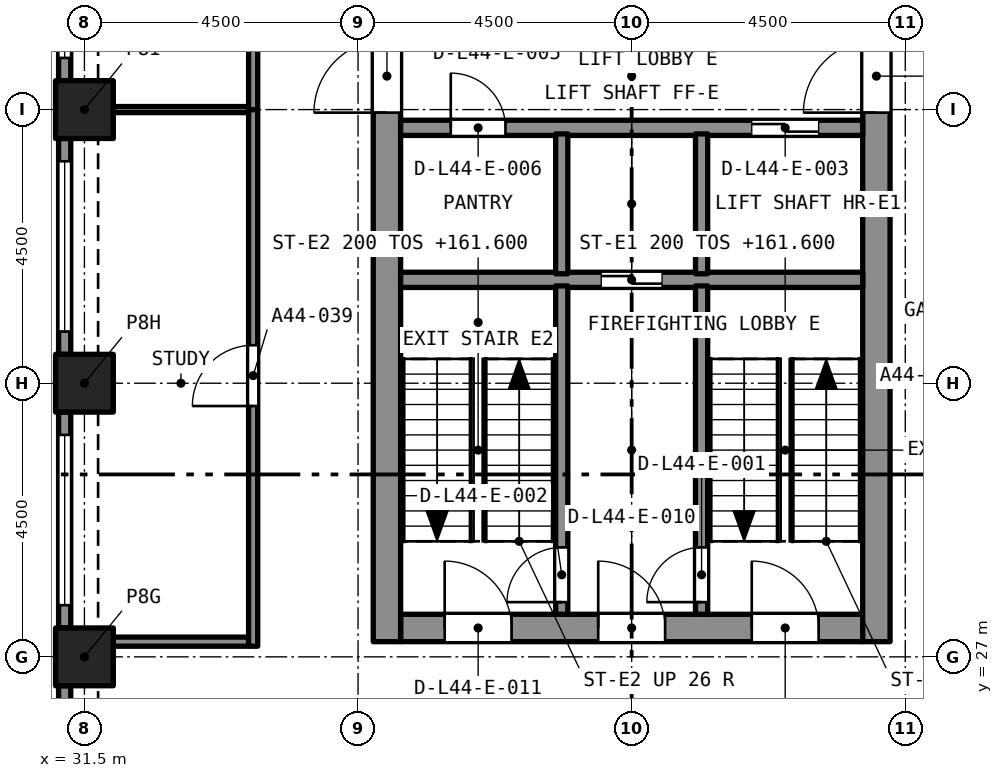
"""IFC4 building model, lengths in metres.
Left out: names, types, materials, properties, quantities, classifications, styles, units other than length and angle.
Written with IfcOpenShell. Run it as: python <this file> out.ifc"""

import sys

from ifc_helpers import new_model, si_unit, direction, frame, frame_2d, origin, origin_2d, place, context, subcontext, project, spatial, rectangle, extrude, element, fill, save


model = new_model("IFC4")
c1 = context("Model", 3, precision=1e-05, world=origin(), true_north=direction((0.0, 1.0)))
c2 = subcontext(c1, "Body", "Model", "MODEL_VIEW")
j1 = project(units=[si_unit("LENGTHUNIT", "METRE"), si_unit("PLANEANGLEUNIT", "RADIAN")], contexts=[c1])
p1 = place(None, origin())
s1 = spatial("IfcSite", under=j1, at=p1, CompositionType="ELEMENT")
p2 = place(p1, origin())
s2 = spatial("IfcBuilding", under=s1, at=p2, CompositionType="ELEMENT")
p3 = place(p2, frame((0.0, 0.0, 159.4)))
s3 = spatial("IfcBuildingStorey", under=s2, at=p3, CompositionType="ELEMENT", Elevation=159.4)
for number, where, z_axis, x_axis in (
    (1, (31.5, 27.0, 0.0), (0.0, 0.0, 1.0), (1.0, 0.0, 0.0)),
    (2, (31.5, 31.5, 0.0), (0.0, 0.0, 1.0), (1.0, 0.0, 0.0)),
    (3, (31.5, 36.0, 0.0), (0.0, 0.0, 1.0), (1.0, 0.0, 0.0)),
):
    element("IfcColumn", number, at=place(p3, frame(where, z_axis=z_axis, x_axis=x_axis)), inside=s3, PredefinedType="COLUMN", context=c2, shape_type="SweptSolid", body=[
        extrude(rectangle(XDim=0.95, YDim=0.95, at=origin_2d()), origin(), (0.0, 0.0, 1.0), 4.4),
    ])
p4 = place(p3, frame((36.7, 27.475, 0.0), z_axis=(0.0, 0.0, 1.0), x_axis=(1.0, 0.0, 0.0)))
e4 = element("IfcWall", 4, at=p4, inside=s3, PredefinedType="SOLIDWALL", context=c2, shape_type="SweptSolid", body=[
    extrude(rectangle(XDim=7.6, YDim=0.45, at=frame_2d((3.8, 0.0))), origin(), (0.0, 0.0, 1.0), 4.4),
])
p5 = place(p4, frame((5.775, 0.0, 0.0)))
e5 = element("IfcOpeningElement", 5, at=p5, cuts=e4, PredefinedType="OPENING", context=c2, shape_type="SweptSolid", body=[
    extrude(rectangle(XDim=1.1, YDim=2.1, at=frame_2d((0.55, 1.05))), frame((0.0, 0.235, 0.0), z_axis=(0.0, -1.0, 0.0), x_axis=(1.0, 0.0, 0.0)), (0.0, 0.0, 1.0), 0.47),
])
p6 = place(p4, frame((3.25, 0.0, 0.0)))
e6 = element("IfcOpeningElement", 6, at=p6, cuts=e4, PredefinedType="OPENING", context=c2, shape_type="SweptSolid", body=[
    extrude(rectangle(XDim=1.1, YDim=2.1, at=frame_2d((0.55, 1.05))), frame((0.0, 0.235, 0.0), z_axis=(0.0, -1.0, 0.0), x_axis=(1.0, 0.0, 0.0)), (0.0, 0.0, 1.0), 0.47),
])
p7 = place(p4, frame((0.725, 0.0, 0.0)))
e7 = element("IfcOpeningElement", 7, at=p7, cuts=e4, PredefinedType="OPENING", context=c2, shape_type="SweptSolid", body=[
    extrude(rectangle(XDim=1.1, YDim=2.1, at=frame_2d((0.55, 1.05))), frame((0.0, 0.235, 0.0), z_axis=(0.0, -1.0, 0.0), x_axis=(1.0, 0.0, 0.0)), (0.0, 0.0, 1.0), 0.47),
])
p8 = place(p3, frame((36.475, 27.25, 0.0), z_axis=(0.0, 0.0, 1.0), x_axis=(0.0, 1.0, 0.0)))
e8 = element("IfcWall", 8, at=p8, inside=s3, PredefinedType="SOLIDWALL", context=c2, shape_type="SweptSolid", body=[
    extrude(rectangle(XDim=13.0, YDim=0.45, at=frame_2d((6.5, 0.0))), origin(), (0.0, 0.0, 1.0), 4.4),
])
p9 = place(p8, frame((8.7, 0.0, 0.0)))
e9 = element("IfcOpeningElement", 9, at=p9, cuts=e8, PredefinedType="OPENING", context=c2, shape_type="SweptSolid", body=[
    extrude(rectangle(XDim=1.2, YDim=2.1, at=frame_2d((0.6, 1.05))), frame((0.0, 0.235, 0.0), z_axis=(0.0, -1.0, 0.0), x_axis=(1.0, 0.0, 0.0)), (0.0, 0.0, 1.0), 0.47),
])
p10 = place(p3, frame((44.525, 27.25, 0.0), z_axis=(0.0, 0.0, 1.0), x_axis=(0.0, 1.0, 0.0)))
e10 = element("IfcWall", 10, at=p10, inside=s3, PredefinedType="SOLIDWALL", context=c2, shape_type="SweptSolid", body=[
    extrude(rectangle(XDim=13.0, YDim=0.45, at=frame_2d((6.5, 0.0))), origin(), (0.0, 0.0, 1.0), 4.4),
])
p11 = place(p10, frame((8.7, 0.0, 0.0)))
e11 = element("IfcOpeningElement", 11, at=p11, cuts=e10, PredefinedType="OPENING", context=c2, shape_type="SweptSolid", body=[
    extrude(rectangle(XDim=1.2, YDim=2.1, at=frame_2d((0.6, 1.05))), frame((0.0, 0.235, 0.0), z_axis=(0.0, -1.0, 0.0), x_axis=(1.0, 0.0, 0.0)), (0.0, 0.0, 1.0), 0.47),
])
p12 = place(p3, frame((31.175, 36.475, 0.0), z_axis=(0.0, 0.0, 1.0), x_axis=(0.0, 1.0, 0.0)))
e12 = element("IfcWall", 12, at=p12, inside=s3, PredefinedType="SOLIDWALL", context=c2, shape_type="SweptSolid", body=[
    extrude(rectangle(XDim=3.55, YDim=0.2, at=frame_2d((1.775, 0.0))), origin(), (0.0, 0.0, 1.0), 4.4),
])
p13 = place(p12, frame((0.375, 0.0, 0.45)))
e13 = element("IfcOpeningElement", 13, at=p13, cuts=e12, PredefinedType="OPENING", context=c2, shape_type="SweptSolid", body=[
    extrude(rectangle(XDim=2.8, YDim=2.55, at=frame_2d((1.4, 1.275))), frame((0.0, 0.11, 0.0), z_axis=(0.0, -1.0, 0.0), x_axis=(1.0, 0.0, 0.0)), (0.0, 0.0, 1.0), 0.22),
])
p14 = place(p3, frame((31.175, 31.975, 0.0), z_axis=(0.0, 0.0, 1.0), x_axis=(0.0, 1.0, 0.0)))
e14 = element("IfcWall", 14, at=p14, inside=s3, PredefinedType="SOLIDWALL", context=c2, shape_type="SweptSolid", body=[
    extrude(rectangle(XDim=3.55, YDim=0.2, at=frame_2d((1.775, 0.0))), origin(), (0.0, 0.0, 1.0), 4.4),
])
p15 = place(p14, frame((0.375, 0.0, 0.45)))
e15 = element("IfcOpeningElement", 15, at=p15, cuts=e14, PredefinedType="OPENING", context=c2, shape_type="SweptSolid", body=[
    extrude(rectangle(XDim=2.8, YDim=2.55, at=frame_2d((1.4, 1.275))), frame((0.0, 0.11, 0.0), z_axis=(0.0, -1.0, 0.0), x_axis=(1.0, 0.0, 0.0)), (0.0, 0.0, 1.0), 0.22),
])
p16 = place(p3, frame((31.175, 27.475, 0.0), z_axis=(0.0, 0.0, 1.0), x_axis=(0.0, 1.0, 0.0)))
e16 = element("IfcWall", 16, at=p16, inside=s3, PredefinedType="SOLIDWALL", context=c2, shape_type="SweptSolid", body=[
    extrude(rectangle(XDim=3.55, YDim=0.2, at=frame_2d((1.775, 0.0))), origin(), (0.0, 0.0, 1.0), 4.4),
])
p17 = place(p16, frame((0.375, 0.0, 0.45)))
e17 = element("IfcOpeningElement", 17, at=p17, cuts=e16, PredefinedType="OPENING", context=c2, shape_type="SweptSolid", body=[
    extrude(rectangle(XDim=2.8, YDim=2.55, at=frame_2d((1.4, 1.275))), frame((0.0, 0.11, 0.0), z_axis=(0.0, -1.0, 0.0), x_axis=(1.0, 0.0, 0.0)), (0.0, 0.0, 1.0), 0.22),
])
p18 = place(p3, frame((31.175, 22.975, 0.0), z_axis=(0.0, 0.0, 1.0), x_axis=(0.0, 1.0, 0.0)))
e18 = element("IfcWall", 18, at=p18, inside=s3, PredefinedType="SOLIDWALL", context=c2, shape_type="SweptSolid", body=[
    extrude(rectangle(XDim=3.55, YDim=0.2, at=frame_2d((1.775, 0.0))), origin(), (0.0, 0.0, 1.0), 4.4),
])
p19 = place(p18, frame((0.375, 0.0, 0.45)))
e19 = element("IfcOpeningElement", 19, at=p19, cuts=e18, PredefinedType="OPENING", context=c2, shape_type="SweptSolid", body=[
    extrude(rectangle(XDim=2.8, YDim=2.55, at=frame_2d((1.4, 1.275))), frame((0.0, 0.11, 0.0), z_axis=(0.0, -1.0, 0.0), x_axis=(1.0, 0.0, 0.0)), (0.0, 0.0, 1.0), 0.22),
])
p20 = place(p3, frame((31.975, 27.25, 0.0), z_axis=(0.0, 0.0, 1.0), x_axis=(1.0, 0.0, 0.0)))
e20 = element("IfcWall", 20, at=p20, inside=s3, PredefinedType="PARTITIONING", context=c2, shape_type="SweptSolid", body=[
    extrude(rectangle(XDim=2.225, YDim=0.15, at=frame_2d((1.112, 0.0))), origin(), (0.0, 0.0, 1.0), 4.1),
])
p21 = place(p3, frame((34.275, 27.175, 0.0), z_axis=(0.0, 0.0, 1.0), x_axis=(0.0, 1.0, 0.0)))
e21 = element("IfcWall", 21, at=p21, inside=s3, PredefinedType="PARTITIONING", context=c2, shape_type="SweptSolid", body=[
    extrude(rectangle(XDim=8.825, YDim=0.15, at=frame_2d((4.413, 0.0))), origin(), (0.0, 0.0, 1.0), 4.1),
])
p22 = place(p21, frame((3.95, 0.0, 0.0)))
e22 = element("IfcOpeningElement", 22, at=p22, cuts=e21, PredefinedType="OPENING", context=c2, shape_type="SweptSolid", body=[
    extrude(rectangle(XDim=1.0, YDim=2.1, at=frame_2d((0.5, 1.05))), frame((0.0, 0.085, 0.0), z_axis=(0.0, -1.0, 0.0), x_axis=(1.0, 0.0, 0.0)), (0.0, 0.0, 1.0), 0.17),
])
p23 = place(p3, frame((34.275, 36.0, 0.0), z_axis=(0.0, 0.0, 1.0), x_axis=(0.0, 1.0, 0.0)))
e23 = element("IfcWall", 23, at=p23, inside=s3, PredefinedType="PARTITIONING", context=c2, shape_type="SweptSolid", body=[
    extrude(rectangle(XDim=4.125, YDim=0.15, at=frame_2d((2.062, 0.0))), origin(), (0.0, 0.0, 1.0), 4.1),
])
p24 = place(p23, frame((1.625, 0.0, 0.0)))
e24 = element("IfcOpeningElement", 24, at=p24, cuts=e23, PredefinedType="OPENING", context=c2, shape_type="SweptSolid", body=[
    extrude(rectangle(XDim=1.0, YDim=2.1, at=frame_2d((0.5, 1.05))), frame((0.0, 0.085, 0.0), z_axis=(0.0, -1.0, 0.0), x_axis=(1.0, 0.0, 0.0)), (0.0, 0.0, 1.0), 0.17),
])
p25 = place(p3, frame((31.975, 36.0, 0.0), z_axis=(0.0, 0.0, 1.0), x_axis=(1.0, 0.0, 0.0)))
e25 = element("IfcWall", 25, at=p25, inside=s3, PredefinedType="PARTITIONING", context=c2, shape_type="SweptSolid", body=[
    extrude(rectangle(XDim=2.225, YDim=0.1, at=frame_2d((1.112, 0.0))), origin(), (0.0, 0.0, 1.0), 4.1),
])
p26 = place(p3, frame((36.7, 33.2, 0.0), z_axis=(0.0, 0.0, 1.0), x_axis=(1.0, 0.0, 0.0)))
e26 = element("IfcWall", 26, at=p26, inside=s3, PredefinedType="SOLIDWALL", context=c2, shape_type="SweptSolid", body=[
    extrude(rectangle(XDim=7.6, YDim=0.25, at=frame_2d((3.8, 0.0))), origin(), (0.0, 0.0, 1.0), 4.1),
])
p27 = place(p26, frame((3.3, 0.0, 0.0)))
e27 = element("IfcOpeningElement", 27, at=p27, cuts=e26, PredefinedType="OPENING", context=c2, shape_type="SweptSolid", body=[
    extrude(rectangle(XDim=1.0, YDim=2.1, at=frame_2d((0.5, 1.05))), frame((0.0, 0.135, 0.0), z_axis=(0.0, -1.0, 0.0), x_axis=(1.0, 0.0, 0.0)), (0.0, 0.0, 1.0), 0.27),
])
p28 = place(p3, frame((36.7, 35.7, 0.0), z_axis=(0.0, 0.0, 1.0), x_axis=(1.0, 0.0, 0.0)))
e28 = element("IfcWall", 28, at=p28, inside=s3, PredefinedType="SOLIDWALL", context=c2, shape_type="SweptSolid", body=[
    extrude(rectangle(XDim=7.6, YDim=0.25, at=frame_2d((3.8, 0.0))), origin(), (0.0, 0.0, 1.0), 4.1),
])
p29 = place(p28, frame((5.775, 0.0, 0.0)))
e29 = element("IfcOpeningElement", 29, at=p29, cuts=e28, PredefinedType="OPENING", context=c2, shape_type="SweptSolid", body=[
    extrude(rectangle(XDim=1.1, YDim=2.4, at=frame_2d((0.55, 1.2))), frame((0.0, 0.135, 0.0), z_axis=(0.0, -1.0, 0.0), x_axis=(1.0, 0.0, 0.0)), (0.0, 0.0, 1.0), 0.27),
])
p30 = place(p28, frame((0.825, 0.0, 0.0)))
e30 = element("IfcOpeningElement", 30, at=p30, cuts=e28, PredefinedType="OPENING", context=c2, shape_type="SweptSolid", body=[
    extrude(rectangle(XDim=0.9, YDim=2.1, at=frame_2d((0.45, 1.05))), frame((0.0, 0.135, 0.0), z_axis=(0.0, -1.0, 0.0), x_axis=(1.0, 0.0, 0.0)), (0.0, 0.0, 1.0), 0.27),
])
p31 = place(p3, frame((41.65, 27.7, 0.0), z_axis=(0.0, 0.0, 1.0), x_axis=(0.0, 1.0, 0.0)))
e31 = element("IfcWall", 31, at=p31, inside=s3, PredefinedType="SOLIDWALL", context=c2, shape_type="SweptSolid", body=[
    extrude(rectangle(XDim=5.4, YDim=0.2, at=frame_2d((2.7, 0.0))), origin(), (0.0, 0.0, 1.0), 4.1),
])
p32 = place(p31, frame((0.2, 0.0, 0.0)))
e32 = element("IfcOpeningElement", 32, at=p32, cuts=e31, PredefinedType="OPENING", context=c2, shape_type="SweptSolid", body=[
    extrude(rectangle(XDim=0.9, YDim=2.1, at=frame_2d((0.45, 1.05))), frame((0.0, 0.11, 0.0), z_axis=(0.0, -1.0, 0.0), x_axis=(1.0, 0.0, 0.0)), (0.0, 0.0, 1.0), 0.22),
])
p33 = place(p3, frame((39.35, 27.7, 0.0), z_axis=(0.0, 0.0, 1.0), x_axis=(0.0, 1.0, 0.0)))
e33 = element("IfcWall", 33, at=p33, inside=s3, PredefinedType="SOLIDWALL", context=c2, shape_type="SweptSolid", body=[
    extrude(rectangle(XDim=5.4, YDim=0.2, at=frame_2d((2.7, 0.0))), origin(), (0.0, 0.0, 1.0), 4.1),
])
p34 = place(p33, frame((0.2, 0.0, 0.0)))
e34 = element("IfcOpeningElement", 34, at=p34, cuts=e33, PredefinedType="OPENING", context=c2, shape_type="SweptSolid", body=[
    extrude(rectangle(XDim=0.9, YDim=2.1, at=frame_2d((0.45, 1.05))), frame((0.0, 0.11, 0.0), z_axis=(0.0, -1.0, 0.0), x_axis=(1.0, 0.0, 0.0)), (0.0, 0.0, 1.0), 0.22),
])
for number, where, z_axis, x_axis in (
    (35, (41.65, 33.3, 0.0), (0.0, 0.0, 1.0), (0.0, 1.0, 0.0)),
    (36, (39.35, 33.3, 0.0), (0.0, 0.0, 1.0), (0.0, 1.0, 0.0)),
):
    element("IfcWall", number, at=place(p3, frame(where, z_axis=z_axis, x_axis=x_axis)), inside=s3, PredefinedType="SOLIDWALL", context=c2, shape_type="SweptSolid", body=[
        extrude(rectangle(XDim=2.3, YDim=0.2, at=frame_2d((1.15, 0.0))), origin(), (0.0, 0.0, 1.0), 4.1),
    ])
p35 = place(p13, origin())
e37 = element("IfcWindow", 37, at=p35, inside=s3, PartitioningType="SINGLE_PANEL", PredefinedType="WINDOW", context=c2, shape_type="SweptSolid", body=[
    extrude(rectangle(XDim=2.8, YDim=2.55, at=frame_2d((1.4, 1.275))), frame((0.0, 0.03, 0.0), z_axis=(0.0, -1.0, 0.0), x_axis=(1.0, 0.0, 0.0)), (0.0, 0.0, 1.0), 0.06),
])
fill(e13, e37)
p36 = place(p15, origin())
e38 = element("IfcWindow", 38, at=p36, inside=s3, PartitioningType="SINGLE_PANEL", PredefinedType="WINDOW", context=c2, shape_type="SweptSolid", body=[
    extrude(rectangle(XDim=2.8, YDim=2.55, at=frame_2d((1.4, 1.275))), frame((0.0, 0.03, 0.0), z_axis=(0.0, -1.0, 0.0), x_axis=(1.0, 0.0, 0.0)), (0.0, 0.0, 1.0), 0.06),
])
fill(e15, e38)
p37 = place(p17, origin())
e39 = element("IfcWindow", 39, at=p37, inside=s3, PartitioningType="SINGLE_PANEL", PredefinedType="WINDOW", context=c2, shape_type="SweptSolid", body=[
    extrude(rectangle(XDim=2.8, YDim=2.55, at=frame_2d((1.4, 1.275))), frame((0.0, 0.03, 0.0), z_axis=(0.0, -1.0, 0.0), x_axis=(1.0, 0.0, 0.0)), (0.0, 0.0, 1.0), 0.06),
])
fill(e17, e39)
p38 = place(p22, origin())
e40 = element("IfcDoor", 40, at=p38, inside=s3, OperationType="SINGLE_SWING_RIGHT", PredefinedType="DOOR", context=c2, shape_type="SweptSolid", body=[
    extrude(rectangle(XDim=1.0, YDim=2.1, at=frame_2d((0.5, 1.05))), frame((0.0, 0.025, 0.0), z_axis=(0.0, -1.0, 0.0), x_axis=(1.0, 0.0, 0.0)), (0.0, 0.0, 1.0), 0.05),
])
fill(e22, e40)
p39 = place(p32, origin())
e41 = element("IfcDoor", 41, at=p39, inside=s3, OperationType="SINGLE_SWING_LEFT", PredefinedType="DOOR", context=c2, shape_type="SweptSolid", body=[
    extrude(rectangle(XDim=0.9, YDim=2.1, at=frame_2d((0.45, 1.05))), frame((0.0, 0.025, 0.0), z_axis=(0.0, -1.0, 0.0), x_axis=(1.0, 0.0, 0.0)), (0.0, 0.0, 1.0), 0.05),
])
fill(e32, e41)
p40 = place(p34, origin())
e42 = element("IfcDoor", 42, at=p40, inside=s3, OperationType="SINGLE_SWING_LEFT", PredefinedType="DOOR", context=c2, shape_type="SweptSolid", body=[
    extrude(rectangle(XDim=0.9, YDim=2.1, at=frame_2d((0.45, 1.05))), frame((0.0, 0.025, 0.0), z_axis=(0.0, -1.0, 0.0), x_axis=(1.0, 0.0, 0.0)), (0.0, 0.0, 1.0), 0.05),
])
fill(e34, e42)
p41 = place(p29, origin())
e43 = element("IfcDoor", 43, at=p41, inside=s3, OperationType="SLIDING_TO_LEFT", PredefinedType="DOOR", context=c2, shape_type="SweptSolid", body=[
    extrude(rectangle(XDim=1.1, YDim=2.4, at=frame_2d((0.55, 1.2))), frame((0.0, 0.025, 0.0), z_axis=(0.0, -1.0, 0.0), x_axis=(1.0, 0.0, 0.0)), (0.0, 0.0, 1.0), 0.05),
])
fill(e29, e43)
p42 = place(p27, origin())
e44 = element("IfcDoor", 44, at=p42, inside=s3, OperationType="SLIDING_TO_LEFT", PredefinedType="DOOR", context=c2, shape_type="SweptSolid", body=[
    extrude(rectangle(XDim=1.0, YDim=2.1, at=frame_2d((0.5, 1.05))), frame((0.0, 0.025, 0.0), z_axis=(0.0, -1.0, 0.0), x_axis=(1.0, 0.0, 0.0)), (0.0, 0.0, 1.0), 0.05),
])
fill(e27, e44)
p43 = place(p30, origin())
e45 = element("IfcDoor", 45, at=p43, inside=s3, OperationType="SINGLE_SWING_LEFT", PredefinedType="DOOR", context=c2, shape_type="SweptSolid", body=[
    extrude(rectangle(XDim=0.9, YDim=2.1, at=frame_2d((0.45, 1.05))), frame((0.0, 0.025, 0.0), z_axis=(0.0, -1.0, 0.0), x_axis=(1.0, 0.0, 0.0)), (0.0, 0.0, 1.0), 0.05),
])
fill(e30, e45)
p44 = place(p5, origin())
e46 = element("IfcDoor", 46, at=p44, inside=s3, OperationType="SINGLE_SWING_LEFT", PredefinedType="DOOR", context=c2, shape_type="SweptSolid", body=[
    extrude(rectangle(XDim=1.1, YDim=2.1, at=frame_2d((0.55, 1.05))), frame((0.0, 0.025, 0.0), z_axis=(0.0, -1.0, 0.0), x_axis=(1.0, 0.0, 0.0)), (0.0, 0.0, 1.0), 0.05),
])
fill(e5, e46)
p45 = place(p6, origin())
e47 = element("IfcDoor", 47, at=p45, inside=s3, OperationType="SINGLE_SWING_LEFT", PredefinedType="DOOR", context=c2, shape_type="SweptSolid", body=[
    extrude(rectangle(XDim=1.1, YDim=2.1, at=frame_2d((0.55, 1.05))), frame((0.0, 0.025, 0.0), z_axis=(0.0, -1.0, 0.0), x_axis=(1.0, 0.0, 0.0)), (0.0, 0.0, 1.0), 0.05),
])
fill(e6, e47)
p46 = place(p7, origin())
e48 = element("IfcDoor", 48, at=p46, inside=s3, OperationType="SINGLE_SWING_LEFT", PredefinedType="DOOR", context=c2, shape_type="SweptSolid", body=[
    extrude(rectangle(XDim=1.1, YDim=2.1, at=frame_2d((0.55, 1.05))), frame((0.0, 0.025, 0.0), z_axis=(0.0, -1.0, 0.0), x_axis=(1.0, 0.0, 0.0)), (0.0, 0.0, 1.0), 0.05),
])
fill(e7, e48)
p47 = place(p9, origin())
e49 = element("IfcDoor", 49, at=p47, inside=s3, OperationType="SINGLE_SWING_LEFT", PredefinedType="DOOR", context=c2, shape_type="SweptSolid", body=[
    extrude(rectangle(XDim=1.2, YDim=2.1, at=frame_2d((0.6, 1.05))), frame((0.0, 0.025, 0.0), z_axis=(0.0, -1.0, 0.0), x_axis=(1.0, 0.0, 0.0)), (0.0, 0.0, 1.0), 0.05),
])
fill(e9, e49)
p48 = place(p11, origin())
e50 = element("IfcDoor", 50, at=p48, inside=s3, OperationType="SINGLE_SWING_LEFT", PredefinedType="DOOR", context=c2, shape_type="SweptSolid", body=[
    extrude(rectangle(XDim=1.2, YDim=2.1, at=frame_2d((0.6, 1.05))), frame((0.0, 0.025, 0.0), z_axis=(0.0, -1.0, 0.0), x_axis=(1.0, 0.0, 0.0)), (0.0, 0.0, 1.0), 0.05),
])
fill(e11, e50)
save(model, sys.argv[1])
